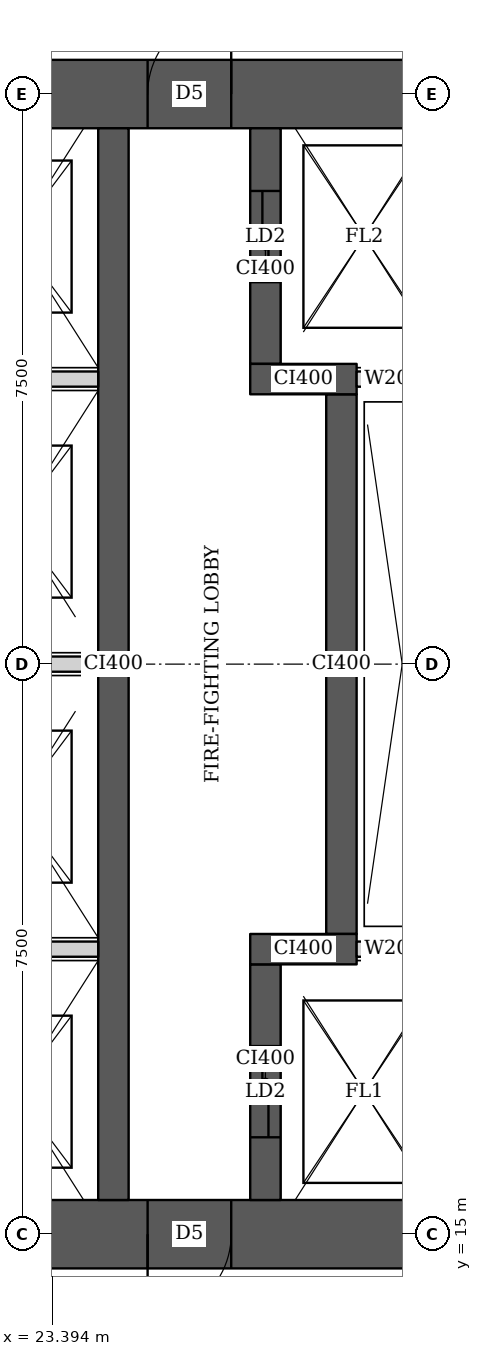
"""IFC4 building model, lengths in metres.
Left out: names, types, materials, properties, quantities, classifications, styles, units other than length and angle.
Written with IfcOpenShell. Run it as: python <this file> out.ifc"""

import sys

from ifc_helpers import new_model, si_unit, direction, frame, frame_2d, origin, place, context, subcontext, project, spatial, rectangle, extrude, element, fill, save


model = new_model("IFC4")
c1 = context("Model", 3, precision=1e-05, world=origin(), true_north=direction((0.0, 1.0)))
c2 = subcontext(c1, "Body", "Model", "MODEL_VIEW")
j1 = project(units=[si_unit("LENGTHUNIT", "METRE"), si_unit("PLANEANGLEUNIT", "RADIAN")], contexts=[c1])
p1 = place(None, origin())
s1 = spatial("IfcSite", under=j1, at=p1, CompositionType="ELEMENT")
p2 = place(p1, origin())
s2 = spatial("IfcBuilding", under=s1, at=p2, CompositionType="ELEMENT")
p3 = place(p2, frame((0.0, 0.0, 285.35)))
s3 = spatial("IfcBuildingStorey", under=s2, at=p3, CompositionType="ELEMENT", Elevation=285.35)
p4 = place(p3, frame((13.95, 15.0, 0.0), z_axis=(0.0, 0.0, 1.0), x_axis=(1.0, 0.0, 0.0)))
e1 = element("IfcWall", 1, at=p4, inside=s3, PredefinedType="SHEAR", context=c2, shape_type="SweptSolid", body=[
    extrude(rectangle(XDim=15.3, YDim=0.9, at=frame_2d((7.65, 0.0))), origin(), (0.0, 0.0, 1.0), 3.75),
])
p5 = place(p4, frame((4.45, 0.0, 0.0)))
e2 = element("IfcOpeningElement", 2, at=p5, cuts=e1, PredefinedType="OPENING", context=c2, shape_type="SweptSolid", body=[
    extrude(rectangle(XDim=1.8, YDim=2.1, at=frame_2d((0.9, 1.05))), frame((0.0, 0.46, 0.0), z_axis=(0.0, -1.0, 0.0), x_axis=(1.0, 0.0, 0.0)), (0.0, 0.0, 1.0), 0.92),
])
p6 = place(p4, frame((10.7, 0.0, 0.0)))
e3 = element("IfcOpeningElement", 3, at=p6, cuts=e1, PredefinedType="OPENING", context=c2, shape_type="SweptSolid", body=[
    extrude(rectangle(XDim=1.1, YDim=2.1, at=frame_2d((0.55, 1.05))), frame((0.0, 0.46, 0.0), z_axis=(0.0, -1.0, 0.0), x_axis=(1.0, 0.0, 0.0)), (0.0, 0.0, 1.0), 0.92),
])
p7 = place(p3, frame((13.95, 30.0, 0.0), z_axis=(0.0, 0.0, 1.0), x_axis=(1.0, 0.0, 0.0)))
e4 = element("IfcWall", 4, at=p7, inside=s3, PredefinedType="SHEAR", context=c2, shape_type="SweptSolid", body=[
    extrude(rectangle(XDim=15.3, YDim=0.9, at=frame_2d((7.65, 0.0))), origin(), (0.0, 0.0, 1.0), 3.75),
])
p8 = place(p7, frame((4.45, 0.0, 0.0)))
e5 = element("IfcOpeningElement", 5, at=p8, cuts=e4, PredefinedType="OPENING", context=c2, shape_type="SweptSolid", body=[
    extrude(rectangle(XDim=1.8, YDim=2.1, at=frame_2d((0.9, 1.05))), frame((0.0, 0.46, 0.0), z_axis=(0.0, -1.0, 0.0), x_axis=(1.0, 0.0, 0.0)), (0.0, 0.0, 1.0), 0.92),
])
p9 = place(p7, frame((10.7, 0.0, 0.0)))
e6 = element("IfcOpeningElement", 6, at=p9, cuts=e4, PredefinedType="OPENING", context=c2, shape_type="SweptSolid", body=[
    extrude(rectangle(XDim=1.1, YDim=2.1, at=frame_2d((0.55, 1.05))), frame((0.0, 0.46, 0.0), z_axis=(0.0, -1.0, 0.0), x_axis=(1.0, 0.0, 0.0)), (0.0, 0.0, 1.0), 0.92),
])
p10 = place(p3, frame((24.2, 15.45, 0.0), z_axis=(0.0, 0.0, 1.0), x_axis=(0.0, 1.0, 0.0)))
e7 = element("IfcWall", 7, at=p10, inside=s3, PredefinedType="SHEAR", context=c2, shape_type="SweptSolid", body=[
    extrude(rectangle(XDim=14.1, YDim=0.4, at=frame_2d((7.05, 0.0))), origin(), (0.0, 0.0, 1.0), 3.75),
])
p11 = place(p3, frame((26.2, 15.45, 0.0), z_axis=(0.0, 0.0, 1.0), x_axis=(0.0, 1.0, 0.0)))
e8 = element("IfcWall", 8, at=p11, inside=s3, PredefinedType="SHEAR", context=c2, shape_type="SweptSolid", body=[
    extrude(rectangle(XDim=3.1, YDim=0.4, at=frame_2d((1.55, 0.0))), origin(), (0.0, 0.0, 1.0), 3.75),
])
p12 = place(p11, frame((0.825, 0.0, 0.0)))
e9 = element("IfcOpeningElement", 9, at=p12, cuts=e8, PredefinedType="OPENING", context=c2, shape_type="SweptSolid", body=[
    extrude(rectangle(XDim=1.2, YDim=2.1, at=frame_2d((0.6, 1.05))), frame((0.0, 0.21, 0.0), z_axis=(0.0, -1.0, 0.0), x_axis=(1.0, 0.0, 0.0)), (0.0, 0.0, 1.0), 0.42),
])
p13 = place(p3, frame((26.0, 18.75, 0.0), z_axis=(0.0, 0.0, 1.0), x_axis=(1.0, 0.0, 0.0)))
e10 = element("IfcWall", 10, at=p13, inside=s3, PredefinedType="SHEAR", context=c2, shape_type="SweptSolid", body=[
    extrude(rectangle(XDim=1.4, YDim=0.4, at=frame_2d((0.7, 0.0))), origin(), (0.0, 0.0, 1.0), 3.75),
])
p14 = place(p3, frame((27.2, 18.95, 0.0), z_axis=(0.0, 0.0, 1.0), x_axis=(0.0, 1.0, 0.0)))
e11 = element("IfcWall", 11, at=p14, inside=s3, PredefinedType="SHEAR", context=c2, shape_type="SweptSolid", body=[
    extrude(rectangle(XDim=7.1, YDim=0.4, at=frame_2d((3.55, 0.0))), origin(), (0.0, 0.0, 1.0), 3.75),
])
p15 = place(p3, frame((26.0, 26.25, 0.0), z_axis=(0.0, 0.0, 1.0), x_axis=(1.0, 0.0, 0.0)))
e12 = element("IfcWall", 12, at=p15, inside=s3, PredefinedType="SHEAR", context=c2, shape_type="SweptSolid", body=[
    extrude(rectangle(XDim=1.4, YDim=0.4, at=frame_2d((0.7, 0.0))), origin(), (0.0, 0.0, 1.0), 3.75),
])
p16 = place(p3, frame((26.2, 26.45, 0.0), z_axis=(0.0, 0.0, 1.0), x_axis=(0.0, 1.0, 0.0)))
e13 = element("IfcWall", 13, at=p16, inside=s3, PredefinedType="SHEAR", context=c2, shape_type="SweptSolid", body=[
    extrude(rectangle(XDim=3.1, YDim=0.4, at=frame_2d((1.55, 0.0))), origin(), (0.0, 0.0, 1.0), 3.75),
])
p17 = place(p16, frame((1.075, 0.0, 0.0)))
e14 = element("IfcOpeningElement", 14, at=p17, cuts=e13, PredefinedType="OPENING", context=c2, shape_type="SweptSolid", body=[
    extrude(rectangle(XDim=1.2, YDim=2.1, at=frame_2d((0.6, 1.05))), frame((0.0, 0.21, 0.0), z_axis=(0.0, -1.0, 0.0), x_axis=(1.0, 0.0, 0.0)), (0.0, 0.0, 1.0), 0.42),
])
for number, where, z_axis, x_axis in (
    (15, (21.8, 18.75, 0.0), (0.0, 0.0, 1.0), (1.0, 0.0, 0.0)),
    (16, (21.8, 22.5, 0.0), (0.0, 0.0, 1.0), (1.0, 0.0, 0.0)),
    (17, (21.8, 26.25, 0.0), (0.0, 0.0, 1.0), (1.0, 0.0, 0.0)),
):
    element("IfcWall", number, at=place(p3, frame(where, z_axis=z_axis, x_axis=x_axis)), inside=s3, PredefinedType="SOLIDWALL", context=c2, shape_type="SweptSolid", body=[
        extrude(rectangle(XDim=2.2, YDim=0.2, at=frame_2d((1.1, 0.0))), origin(), (0.0, 0.0, 1.0), 3.5),
    ])
for number, where, z_axis, x_axis in (
    (18, (27.4, 18.75, 0.0), (0.0, 0.0, 1.0), (1.0, 0.0, 0.0)),
    (19, (27.4, 26.25, 0.0), (0.0, 0.0, 1.0), (1.0, 0.0, 0.0)),
):
    element("IfcWall", number, at=place(p3, frame(where, z_axis=z_axis, x_axis=x_axis)), inside=s3, PredefinedType="SOLIDWALL", context=c2, shape_type="SweptSolid", body=[
        extrude(rectangle(XDim=0.95, YDim=0.2, at=frame_2d((0.475, 0.0))), origin(), (0.0, 0.0, 1.0), 3.5),
    ])
p18 = place(p6, origin())
e20 = element("IfcDoor", 20, at=p18, inside=s3, OperationType="SINGLE_SWING_RIGHT", PredefinedType="DOOR", context=c2, shape_type="SweptSolid", body=[
    extrude(rectangle(XDim=1.1, YDim=2.1, at=frame_2d((0.55, 1.05))), frame((0.0, 0.025, 0.0), z_axis=(0.0, -1.0, 0.0), x_axis=(1.0, 0.0, 0.0)), (0.0, 0.0, 1.0), 0.05),
])
fill(e3, e20)
p19 = place(p9, origin())
e21 = element("IfcDoor", 21, at=p19, inside=s3, OperationType="SINGLE_SWING_RIGHT", PredefinedType="DOOR", context=c2, shape_type="SweptSolid", body=[
    extrude(rectangle(XDim=1.1, YDim=2.1, at=frame_2d((0.55, 1.05))), frame((0.0, 0.025, 0.0), z_axis=(0.0, -1.0, 0.0), x_axis=(1.0, 0.0, 0.0)), (0.0, 0.0, 1.0), 0.05),
])
fill(e6, e21)
p20 = place(p12, origin())
e22 = element("IfcDoor", 22, at=p20, inside=s3, OperationType="DOUBLE_DOOR_SLIDING", PredefinedType="DOOR", context=c2, shape_type="SweptSolid", body=[
    extrude(rectangle(XDim=1.2, YDim=2.1, at=frame_2d((0.6, 1.05))), frame((0.0, 0.025, 0.0), z_axis=(0.0, -1.0, 0.0), x_axis=(1.0, 0.0, 0.0)), (0.0, 0.0, 1.0), 0.05),
])
fill(e9, e22)
p21 = place(p17, origin())
e23 = element("IfcDoor", 23, at=p21, inside=s3, OperationType="DOUBLE_DOOR_SLIDING", PredefinedType="DOOR", context=c2, shape_type="SweptSolid", body=[
    extrude(rectangle(XDim=1.2, YDim=2.1, at=frame_2d((0.6, 1.05))), frame((0.0, 0.025, 0.0), z_axis=(0.0, -1.0, 0.0), x_axis=(1.0, 0.0, 0.0)), (0.0, 0.0, 1.0), 0.05),
])
fill(e14, e23)
save(model, sys.argv[1])
